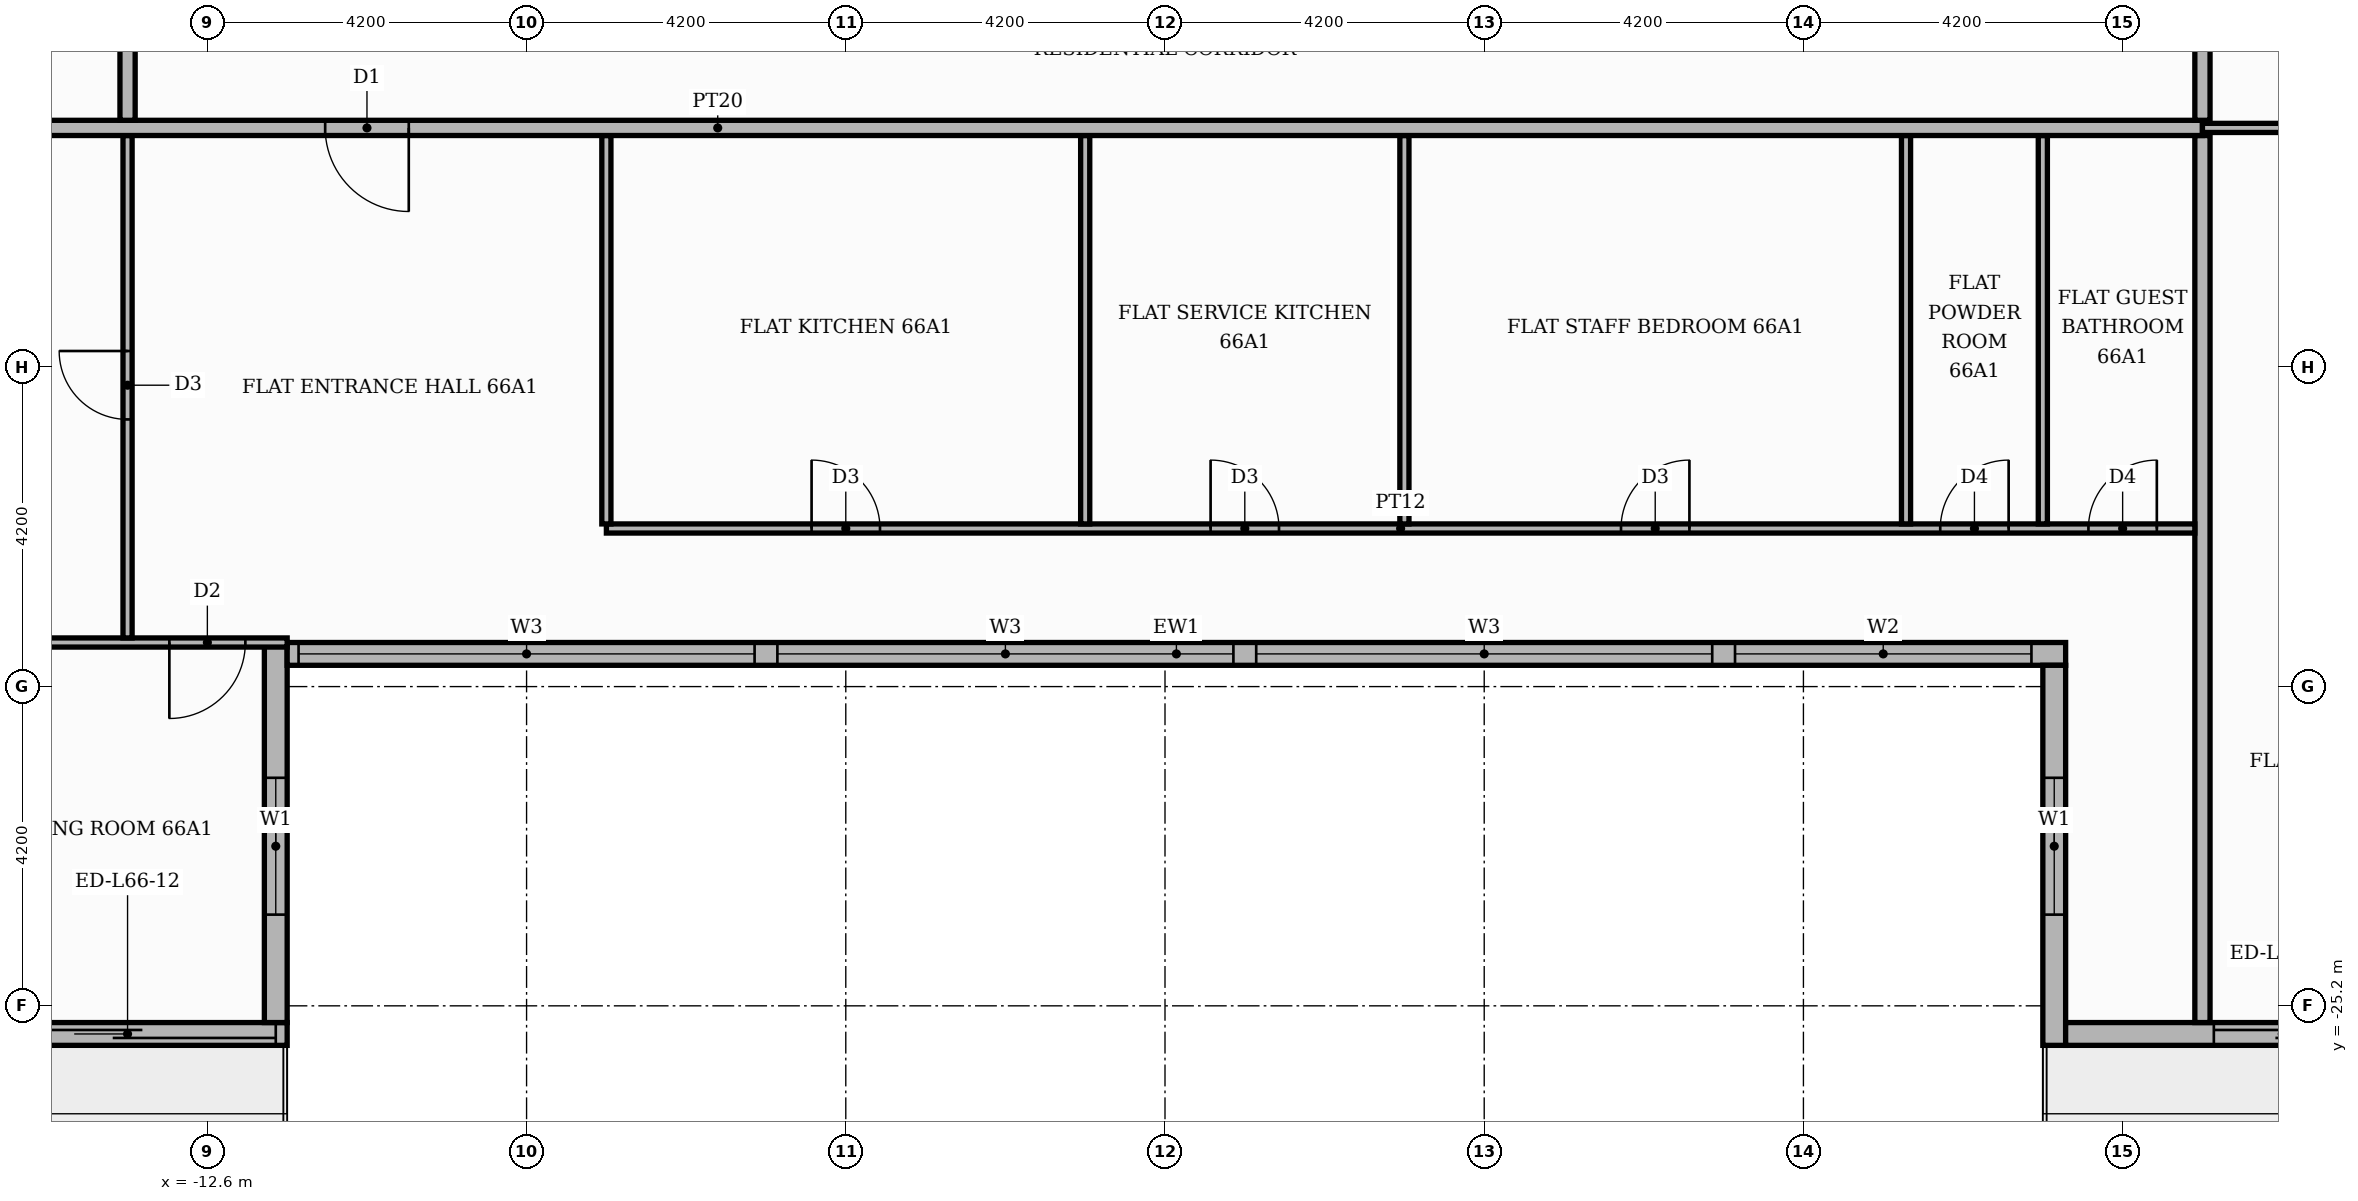
"""IFC4 building model, lengths in metres.
Left out: names, types, materials, properties, quantities, classifications, styles, units other than length and angle.
Written with IfcOpenShell. Run it as: python <this file> out.ifc"""

import sys

from ifc_helpers import new_model, si_unit, direction, frame, frame_2d, origin, place, context, subcontext, project, spatial, rectangle, extrude, element, fill, save


model = new_model("IFC4")
c1 = context("Model", 3, precision=1e-05, world=origin(), true_north=direction((0.0, 1.0)))
c2 = subcontext(c1, "Body", "Model", "MODEL_VIEW")
j1 = project(units=[si_unit("LENGTHUNIT", "METRE"), si_unit("PLANEANGLEUNIT", "RADIAN")], contexts=[c1])
p1 = place(None, origin())
s1 = spatial("IfcSite", under=j1, at=p1, CompositionType="ELEMENT")
p2 = place(p1, origin())
s2 = spatial("IfcBuilding", under=s1, at=p2, CompositionType="ELEMENT")
p3 = place(p2, frame((0.0, 0.0, 275.7)))
s3 = spatial("IfcBuildingStorey", under=s2, at=p3, CompositionType="ELEMENT", Elevation=275.7)
p4 = place(p3, frame((-16.2, -25.57, 0.0), z_axis=(0.0, 0.0, 1.0), x_axis=(1.0, 0.0, 0.0)))
e1 = element("IfcWall", 1, at=p4, inside=s3, PredefinedType="STANDARD", context=c2, shape_type="SweptSolid", body=[
    extrude(rectangle(XDim=4.65, YDim=0.3, at=frame_2d((2.325, 0.0))), origin(), (0.0, 0.0, 1.0), 3.48),
])
p5 = place(p4, frame((0.6, 0.0, 0.0)))
e2 = element("IfcOpeningElement", 2, at=p5, cuts=e1, PredefinedType="OPENING", context=c2, shape_type="SweptSolid", body=[
    extrude(rectangle(XDim=3.9, YDim=2.4, at=frame_2d((1.95, 1.2))), frame((0.0, 0.16, 0.0), z_axis=(0.0, -1.0, 0.0), x_axis=(1.0, 0.0, 0.0)), (0.0, 0.0, 1.0), 0.32),
])
p6 = place(p3, frame((-11.7, -25.42, 0.0), z_axis=(0.0, 0.0, 1.0), x_axis=(0.0, 1.0, 0.0)))
e3 = element("IfcWall", 3, at=p6, inside=s3, PredefinedType="STANDARD", context=c2, shape_type="SweptSolid", body=[
    extrude(rectangle(XDim=5.0, YDim=0.3, at=frame_2d((2.5, 0.0))), origin(), (0.0, 0.0, 1.0), 3.48),
])
p7 = place(p6, frame((1.42, 0.0, 0.9)))
e4 = element("IfcOpeningElement", 4, at=p7, cuts=e3, PredefinedType="OPENING", context=c2, shape_type="SweptSolid", body=[
    extrude(rectangle(XDim=1.8, YDim=2.1, at=frame_2d((0.9, 1.05))), frame((0.0, 0.16, 0.0), z_axis=(0.0, -1.0, 0.0), x_axis=(1.0, 0.0, 0.0)), (0.0, 0.0, 1.0), 0.32),
])
p8 = place(p3, frame((-11.55, -20.57, 0.0), z_axis=(0.0, 0.0, 1.0), x_axis=(1.0, 0.0, 0.0)))
e5 = element("IfcWall", 5, at=p8, inside=s3, PredefinedType="STANDARD", context=c2, shape_type="SweptSolid", body=[
    extrude(rectangle(XDim=23.4, YDim=0.3, at=frame_2d((11.7, 0.0))), origin(), (0.0, 0.0, 1.0), 3.48),
])
p9 = place(p8, frame((0.15, 0.0, 0.9)))
e6 = element("IfcOpeningElement", 6, at=p9, cuts=e5, PredefinedType="OPENING", context=c2, shape_type="SweptSolid", body=[
    extrude(rectangle(XDim=6.0, YDim=2.1, at=frame_2d((3.0, 1.05))), frame((0.0, 0.16, 0.0), z_axis=(0.0, -1.0, 0.0), x_axis=(1.0, 0.0, 0.0)), (0.0, 0.0, 1.0), 0.32),
])
p10 = place(p8, frame((6.45, 0.0, 0.9)))
e7 = element("IfcOpeningElement", 7, at=p10, cuts=e5, PredefinedType="OPENING", context=c2, shape_type="SweptSolid", body=[
    extrude(rectangle(XDim=6.0, YDim=2.1, at=frame_2d((3.0, 1.05))), frame((0.0, 0.16, 0.0), z_axis=(0.0, -1.0, 0.0), x_axis=(1.0, 0.0, 0.0)), (0.0, 0.0, 1.0), 0.32),
])
p11 = place(p8, frame((12.75, 0.0, 0.9)))
e8 = element("IfcOpeningElement", 8, at=p11, cuts=e5, PredefinedType="OPENING", context=c2, shape_type="SweptSolid", body=[
    extrude(rectangle(XDim=6.0, YDim=2.1, at=frame_2d((3.0, 1.05))), frame((0.0, 0.16, 0.0), z_axis=(0.0, -1.0, 0.0), x_axis=(1.0, 0.0, 0.0)), (0.0, 0.0, 1.0), 0.32),
])
p12 = place(p8, frame((19.05, 0.0, 0.9)))
e9 = element("IfcOpeningElement", 9, at=p12, cuts=e5, PredefinedType="OPENING", context=c2, shape_type="SweptSolid", body=[
    extrude(rectangle(XDim=3.9, YDim=2.1, at=frame_2d((1.95, 1.05))), frame((0.0, 0.16, 0.0), z_axis=(0.0, -1.0, 0.0), x_axis=(1.0, 0.0, 0.0)), (0.0, 0.0, 1.0), 0.32),
])
p13 = place(p3, frame((11.7, -20.72, 0.0), z_axis=(0.0, 0.0, 1.0), x_axis=(0.0, -1.0, 0.0)))
e10 = element("IfcWall", 10, at=p13, inside=s3, PredefinedType="STANDARD", context=c2, shape_type="SweptSolid", body=[
    extrude(rectangle(XDim=5.0, YDim=0.3, at=frame_2d((2.5, 0.0))), origin(), (0.0, 0.0, 1.0), 3.48),
])
p14 = place(p13, frame((1.48, 0.0, 0.9)))
e11 = element("IfcOpeningElement", 11, at=p14, cuts=e10, PredefinedType="OPENING", context=c2, shape_type="SweptSolid", body=[
    extrude(rectangle(XDim=1.8, YDim=2.1, at=frame_2d((0.9, 1.05))), frame((0.0, 0.16, 0.0), z_axis=(0.0, -1.0, 0.0), x_axis=(1.0, 0.0, 0.0)), (0.0, 0.0, 1.0), 0.32),
])
p15 = place(p3, frame((11.85, -25.57, 0.0), z_axis=(0.0, 0.0, 1.0), x_axis=(1.0, 0.0, 0.0)))
e12 = element("IfcWall", 12, at=p15, inside=s3, PredefinedType="STANDARD", context=c2, shape_type="SweptSolid", body=[
    extrude(rectangle(XDim=4.35, YDim=0.3, at=frame_2d((2.175, 0.0))), origin(), (0.0, 0.0, 1.0), 3.48),
])
p16 = place(p15, frame((1.95, 0.0, 0.0)))
e13 = element("IfcOpeningElement", 13, at=p16, cuts=e12, PredefinedType="OPENING", context=c2, shape_type="SweptSolid", body=[
    extrude(rectangle(XDim=1.8, YDim=2.4, at=frame_2d((0.9, 1.2))), frame((0.0, 0.16, 0.0), z_axis=(0.0, -1.0, 0.0), x_axis=(1.0, 0.0, 0.0)), (0.0, 0.0, 1.0), 0.32),
])
p17 = place(p3, frame((13.65, -25.42, 0.0), z_axis=(0.0, 0.0, 1.0), x_axis=(0.0, 1.0, 0.0)))
e14 = element("IfcWall", 14, at=p17, inside=s3, PredefinedType="PARTITIONING", context=c2, shape_type="SweptSolid", body=[
    extrude(rectangle(XDim=11.67, YDim=0.2, at=frame_2d((5.835, 0.0))), origin(), (0.0, 0.0, 1.0), 3.48),
])
p18 = place(p3, frame((-20.719, -20.42, 0.0), z_axis=(0.0, 0.0, 1.0), x_axis=(1.0, 0.0, 0.0)))
e15 = element("IfcWall", 15, at=p18, inside=s3, PredefinedType="PARTITIONING", context=c2, shape_type="SweptSolid", body=[
    extrude(rectangle(XDim=9.169, YDim=0.12, at=frame_2d((4.584, 0.0))), origin(), (0.0, 0.0, 1.0), 3.48),
])
p19 = place(p18, frame((7.619, 0.0, 0.0)))
e16 = element("IfcOpeningElement", 16, at=p19, cuts=e15, PredefinedType="OPENING", context=c2, shape_type="SweptSolid", body=[
    extrude(rectangle(XDim=1.0, YDim=2.1, at=frame_2d((0.5, 1.05))), frame((0.0, 0.07, 0.0), z_axis=(0.0, -1.0, 0.0), x_axis=(1.0, 0.0, 0.0)), (0.0, 0.0, 1.0), 0.14),
])
p20 = place(p3, frame((-13.65, -20.36, 0.0), z_axis=(0.0, 0.0, 1.0), x_axis=(0.0, 1.0, 0.0)))
e17 = element("IfcWall", 17, at=p20, inside=s3, PredefinedType="PARTITIONING", context=c2, shape_type="SweptSolid", body=[
    extrude(rectangle(XDim=6.61, YDim=0.12, at=frame_2d((3.305, 0.0))), origin(), (0.0, 0.0, 1.0), 3.48),
])
p21 = place(p20, frame((2.875, 0.0, 0.0)))
e18 = element("IfcOpeningElement", 18, at=p21, cuts=e17, PredefinedType="OPENING", context=c2, shape_type="SweptSolid", body=[
    extrude(rectangle(XDim=0.9, YDim=2.1, at=frame_2d((0.45, 1.05))), frame((0.0, 0.07, 0.0), z_axis=(0.0, -1.0, 0.0), x_axis=(1.0, 0.0, 0.0)), (0.0, 0.0, 1.0), 0.14),
])
p22 = place(p3, frame((-7.35, -18.92, 0.0), z_axis=(0.0, 0.0, 1.0), x_axis=(1.0, 0.0, 0.0)))
e19 = element("IfcWall", 19, at=p22, inside=s3, PredefinedType="PARTITIONING", context=c2, shape_type="SweptSolid", body=[
    extrude(rectangle(XDim=20.9, YDim=0.12, at=frame_2d((10.45, 0.0))), origin(), (0.0, 0.0, 1.0), 3.48),
])
p23 = place(p22, frame((2.7, 0.0, 0.0)))
e20 = element("IfcOpeningElement", 20, at=p23, cuts=e19, PredefinedType="OPENING", context=c2, shape_type="SweptSolid", body=[
    extrude(rectangle(XDim=0.9, YDim=2.1, at=frame_2d((0.45, 1.05))), frame((0.0, 0.07, 0.0), z_axis=(0.0, -1.0, 0.0), x_axis=(1.0, 0.0, 0.0)), (0.0, 0.0, 1.0), 0.14),
])
p24 = place(p22, frame((7.95, 0.0, 0.0)))
e21 = element("IfcOpeningElement", 21, at=p24, cuts=e19, PredefinedType="OPENING", context=c2, shape_type="SweptSolid", body=[
    extrude(rectangle(XDim=0.9, YDim=2.1, at=frame_2d((0.45, 1.05))), frame((0.0, 0.07, 0.0), z_axis=(0.0, -1.0, 0.0), x_axis=(1.0, 0.0, 0.0)), (0.0, 0.0, 1.0), 0.14),
])
p25 = place(p22, frame((13.35, 0.0, 0.0)))
e22 = element("IfcOpeningElement", 22, at=p25, cuts=e19, PredefinedType="OPENING", context=c2, shape_type="SweptSolid", body=[
    extrude(rectangle(XDim=0.9, YDim=2.1, at=frame_2d((0.45, 1.05))), frame((0.0, 0.07, 0.0), z_axis=(0.0, -1.0, 0.0), x_axis=(1.0, 0.0, 0.0)), (0.0, 0.0, 1.0), 0.14),
])
p26 = place(p22, frame((17.55, 0.0, 0.0)))
e23 = element("IfcOpeningElement", 23, at=p26, cuts=e19, PredefinedType="OPENING", context=c2, shape_type="SweptSolid", body=[
    extrude(rectangle(XDim=0.9, YDim=2.1, at=frame_2d((0.45, 1.05))), frame((0.0, 0.07, 0.0), z_axis=(0.0, -1.0, 0.0), x_axis=(1.0, 0.0, 0.0)), (0.0, 0.0, 1.0), 0.14),
])
p27 = place(p22, frame((19.5, 0.0, 0.0)))
e24 = element("IfcOpeningElement", 24, at=p27, cuts=e19, PredefinedType="OPENING", context=c2, shape_type="SweptSolid", body=[
    extrude(rectangle(XDim=0.9, YDim=2.1, at=frame_2d((0.45, 1.05))), frame((0.0, 0.07, 0.0), z_axis=(0.0, -1.0, 0.0), x_axis=(1.0, 0.0, 0.0)), (0.0, 0.0, 1.0), 0.14),
])
for number, where, z_axis, x_axis in (
    (25, (-7.35, -18.86, 0.0), (0.0, 0.0, 1.0), (0.0, 1.0, 0.0)),
    (26, (-1.05, -18.86, 0.0), (0.0, 0.0, 1.0), (0.0, 1.0, 0.0)),
    (27, (3.15, -18.86, 0.0), (0.0, 0.0, 1.0), (0.0, 1.0, 0.0)),
    (28, (9.75, -18.86, 0.0), (0.0, 0.0, 1.0), (0.0, 1.0, 0.0)),
    (29, (11.55, -18.86, 0.0), (0.0, 0.0, 1.0), (0.0, 1.0, 0.0)),
):
    element("IfcWall", number, at=place(p3, frame(where, z_axis=z_axis, x_axis=x_axis)), inside=s3, PredefinedType="PARTITIONING", context=c2, shape_type="SweptSolid", body=[
        extrude(rectangle(XDim=5.11, YDim=0.12, at=frame_2d((2.555, 0.0))), origin(), (0.0, 0.0, 1.0), 3.48),
    ])
p28 = place(p3, frame((-25.42, -13.65, 0.0), z_axis=(0.0, 0.0, 1.0), x_axis=(1.0, 0.0, 0.0)))
e30 = element("IfcWall", 30, at=p28, inside=s3, PredefinedType="PARTITIONING", context=c2, shape_type="SweptSolid", body=[
    extrude(rectangle(XDim=39.07, YDim=0.2, at=frame_2d((19.535, 0.0))), origin(), (0.0, 0.0, 1.0), 3.48),
])
p29 = place(p28, frame((14.37, 0.0, 0.0)))
e31 = element("IfcOpeningElement", 31, at=p29, cuts=e30, PredefinedType="OPENING", context=c2, shape_type="SweptSolid", body=[
    extrude(rectangle(XDim=1.1, YDim=2.4, at=frame_2d((0.55, 1.2))), frame((0.0, 0.11, 0.0), z_axis=(0.0, -1.0, 0.0), x_axis=(1.0, 0.0, 0.0)), (0.0, 0.0, 1.0), 0.22),
])
p30 = place(p3, frame((13.65, -13.65, 0.0), z_axis=(0.0, 0.0, 1.0), x_axis=(1.0, 0.0, 0.0)))
e32 = element("IfcWall", 32, at=p30, inside=s3, PredefinedType="PARTITIONING", context=c2, shape_type="SweptSolid", body=[
    extrude(rectangle(XDim=6.17, YDim=0.12, at=frame_2d((3.085, 0.0))), origin(), (0.0, 0.0, 1.0), 3.48),
])
p31 = place(p30, frame((2.585, 0.0, 0.0)))
e33 = element("IfcOpeningElement", 33, at=p31, cuts=e32, PredefinedType="OPENING", context=c2, shape_type="SweptSolid", body=[
    extrude(rectangle(XDim=1.0, YDim=2.1, at=frame_2d((0.5, 1.05))), frame((0.0, 0.07, 0.0), z_axis=(0.0, -1.0, 0.0), x_axis=(1.0, 0.0, 0.0)), (0.0, 0.0, 1.0), 0.14),
])
for number, where, z_axis, x_axis in (
    (34, (-13.65, -13.55, 0.0), (0.0, 0.0, 1.0), (0.0, 1.0, 0.0)),
    (35, (13.65, -13.55, 0.0), (0.0, 0.0, 1.0), (0.0, 1.0, 0.0)),
):
    element("IfcWall", number, at=place(p3, frame(where, z_axis=z_axis, x_axis=x_axis)), inside=s3, PredefinedType="PARTITIONING", context=c2, shape_type="SweptSolid", body=[
        extrude(rectangle(XDim=2.45, YDim=0.2, at=frame_2d((1.225, 0.0))), origin(), (0.0, 0.0, 1.0), 3.48),
    ])
p32 = place(p5, origin())
e36 = element("IfcDoor", 36, at=p32, inside=s3, OperationType="SLIDING_TO_LEFT", PredefinedType="DOOR", context=c2, shape_type="SweptSolid", body=[
    extrude(rectangle(XDim=3.9, YDim=2.4, at=frame_2d((1.95, 1.2))), frame((0.0, 0.025, 0.0), z_axis=(0.0, -1.0, 0.0), x_axis=(1.0, 0.0, 0.0)), (0.0, 0.0, 1.0), 0.05),
])
fill(e2, e36)
p33 = place(p7, origin())
e37 = element("IfcWindow", 37, at=p33, inside=s3, PartitioningType="SINGLE_PANEL", PredefinedType="WINDOW", context=c2, shape_type="SweptSolid", body=[
    extrude(rectangle(XDim=1.8, YDim=2.1, at=frame_2d((0.9, 1.05))), frame((0.0, 0.03, 0.0), z_axis=(0.0, -1.0, 0.0), x_axis=(1.0, 0.0, 0.0)), (0.0, 0.0, 1.0), 0.06),
])
fill(e4, e37)
p34 = place(p9, origin())
e38 = element("IfcWindow", 38, at=p34, inside=s3, PartitioningType="SINGLE_PANEL", PredefinedType="WINDOW", context=c2, shape_type="SweptSolid", body=[
    extrude(rectangle(XDim=6.0, YDim=2.1, at=frame_2d((3.0, 1.05))), frame((0.0, 0.03, 0.0), z_axis=(0.0, -1.0, 0.0), x_axis=(1.0, 0.0, 0.0)), (0.0, 0.0, 1.0), 0.06),
])
fill(e6, e38)
p35 = place(p10, origin())
e39 = element("IfcWindow", 39, at=p35, inside=s3, PartitioningType="SINGLE_PANEL", PredefinedType="WINDOW", context=c2, shape_type="SweptSolid", body=[
    extrude(rectangle(XDim=6.0, YDim=2.1, at=frame_2d((3.0, 1.05))), frame((0.0, 0.03, 0.0), z_axis=(0.0, -1.0, 0.0), x_axis=(1.0, 0.0, 0.0)), (0.0, 0.0, 1.0), 0.06),
])
fill(e7, e39)
p36 = place(p11, origin())
e40 = element("IfcWindow", 40, at=p36, inside=s3, PartitioningType="SINGLE_PANEL", PredefinedType="WINDOW", context=c2, shape_type="SweptSolid", body=[
    extrude(rectangle(XDim=6.0, YDim=2.1, at=frame_2d((3.0, 1.05))), frame((0.0, 0.03, 0.0), z_axis=(0.0, -1.0, 0.0), x_axis=(1.0, 0.0, 0.0)), (0.0, 0.0, 1.0), 0.06),
])
fill(e8, e40)
p37 = place(p12, origin())
e41 = element("IfcWindow", 41, at=p37, inside=s3, PartitioningType="SINGLE_PANEL", PredefinedType="WINDOW", context=c2, shape_type="SweptSolid", body=[
    extrude(rectangle(XDim=3.9, YDim=2.1, at=frame_2d((1.95, 1.05))), frame((0.0, 0.03, 0.0), z_axis=(0.0, -1.0, 0.0), x_axis=(1.0, 0.0, 0.0)), (0.0, 0.0, 1.0), 0.06),
])
fill(e9, e41)
p38 = place(p14, origin())
e42 = element("IfcWindow", 42, at=p38, inside=s3, PartitioningType="SINGLE_PANEL", PredefinedType="WINDOW", context=c2, shape_type="SweptSolid", body=[
    extrude(rectangle(XDim=1.8, YDim=2.1, at=frame_2d((0.9, 1.05))), frame((0.0, 0.03, 0.0), z_axis=(0.0, -1.0, 0.0), x_axis=(1.0, 0.0, 0.0)), (0.0, 0.0, 1.0), 0.06),
])
fill(e11, e42)
p39 = place(p16, origin())
e43 = element("IfcDoor", 43, at=p39, inside=s3, OperationType="SLIDING_TO_RIGHT", PredefinedType="DOOR", context=c2, shape_type="SweptSolid", body=[
    extrude(rectangle(XDim=1.8, YDim=2.4, at=frame_2d((0.9, 1.2))), frame((0.0, 0.025, 0.0), z_axis=(0.0, -1.0, 0.0), x_axis=(1.0, 0.0, 0.0)), (0.0, 0.0, 1.0), 0.05),
])
fill(e13, e43)
p40 = place(p29, frame((1.1, 0.0, 0.0), z_axis=(0.0, 0.0, 1.0), x_axis=(-1.0, 0.0, 0.0)))
e44 = element("IfcDoor", 44, at=p40, inside=s3, OperationType="SINGLE_SWING_RIGHT", PredefinedType="DOOR", context=c2, shape_type="SweptSolid", body=[
    extrude(rectangle(XDim=1.1, YDim=2.4, at=frame_2d((0.55, 1.2))), frame((0.0, 0.025, 0.0), z_axis=(0.0, -1.0, 0.0), x_axis=(1.0, 0.0, 0.0)), (0.0, 0.0, 1.0), 0.05),
])
fill(e31, e44)
p41 = place(p21, origin())
e45 = element("IfcDoor", 45, at=p41, inside=s3, OperationType="SINGLE_SWING_RIGHT", PredefinedType="DOOR", context=c2, shape_type="SweptSolid", body=[
    extrude(rectangle(XDim=0.9, YDim=2.1, at=frame_2d((0.45, 1.05))), frame((0.0, 0.025, 0.0), z_axis=(0.0, -1.0, 0.0), x_axis=(1.0, 0.0, 0.0)), (0.0, 0.0, 1.0), 0.05),
])
fill(e18, e45)
p42 = place(p23, origin())
e46 = element("IfcDoor", 46, at=p42, inside=s3, OperationType="SINGLE_SWING_LEFT", PredefinedType="DOOR", context=c2, shape_type="SweptSolid", body=[
    extrude(rectangle(XDim=0.9, YDim=2.1, at=frame_2d((0.45, 1.05))), frame((0.0, 0.025, 0.0), z_axis=(0.0, -1.0, 0.0), x_axis=(1.0, 0.0, 0.0)), (0.0, 0.0, 1.0), 0.05),
])
fill(e20, e46)
p43 = place(p24, origin())
e47 = element("IfcDoor", 47, at=p43, inside=s3, OperationType="SINGLE_SWING_LEFT", PredefinedType="DOOR", context=c2, shape_type="SweptSolid", body=[
    extrude(rectangle(XDim=0.9, YDim=2.1, at=frame_2d((0.45, 1.05))), frame((0.0, 0.025, 0.0), z_axis=(0.0, -1.0, 0.0), x_axis=(1.0, 0.0, 0.0)), (0.0, 0.0, 1.0), 0.05),
])
fill(e21, e47)
p44 = place(p25, origin())
e48 = element("IfcDoor", 48, at=p44, inside=s3, OperationType="SINGLE_SWING_RIGHT", PredefinedType="DOOR", context=c2, shape_type="SweptSolid", body=[
    extrude(rectangle(XDim=0.9, YDim=2.1, at=frame_2d((0.45, 1.05))), frame((0.0, 0.025, 0.0), z_axis=(0.0, -1.0, 0.0), x_axis=(1.0, 0.0, 0.0)), (0.0, 0.0, 1.0), 0.05),
])
fill(e22, e48)
p45 = place(p26, origin())
e49 = element("IfcDoor", 49, at=p45, inside=s3, OperationType="SINGLE_SWING_RIGHT", PredefinedType="DOOR", context=c2, shape_type="SweptSolid", body=[
    extrude(rectangle(XDim=0.9, YDim=2.1, at=frame_2d((0.45, 1.05))), frame((0.0, 0.025, 0.0), z_axis=(0.0, -1.0, 0.0), x_axis=(1.0, 0.0, 0.0)), (0.0, 0.0, 1.0), 0.05),
])
fill(e23, e49)
p46 = place(p27, origin())
e50 = element("IfcDoor", 50, at=p46, inside=s3, OperationType="SINGLE_SWING_RIGHT", PredefinedType="DOOR", context=c2, shape_type="SweptSolid", body=[
    extrude(rectangle(XDim=0.9, YDim=2.1, at=frame_2d((0.45, 1.05))), frame((0.0, 0.025, 0.0), z_axis=(0.0, -1.0, 0.0), x_axis=(1.0, 0.0, 0.0)), (0.0, 0.0, 1.0), 0.05),
])
fill(e24, e50)
p47 = place(p19, frame((1.0, 0.0, 0.0), z_axis=(0.0, 0.0, 1.0), x_axis=(-1.0, 0.0, 0.0)))
e51 = element("IfcDoor", 51, at=p47, inside=s3, OperationType="SINGLE_SWING_LEFT", PredefinedType="DOOR", context=c2, shape_type="SweptSolid", body=[
    extrude(rectangle(XDim=1.0, YDim=2.1, at=frame_2d((0.5, 1.05))), frame((0.0, 0.025, 0.0), z_axis=(0.0, -1.0, 0.0), x_axis=(1.0, 0.0, 0.0)), (0.0, 0.0, 1.0), 0.05),
])
fill(e16, e51)
save(model, sys.argv[1])
